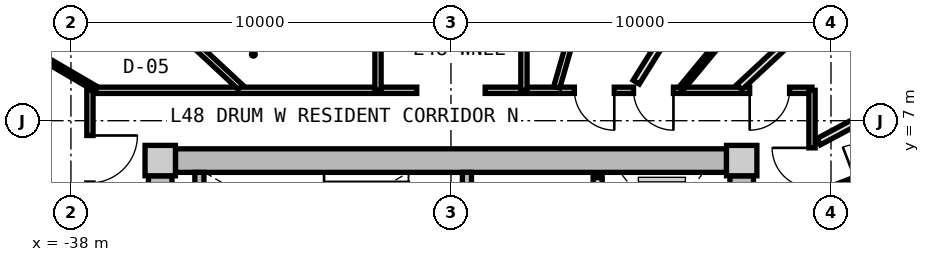
"""IFC4 building model, lengths in metres.
Left out: names, types, materials, properties, quantities, classifications, styles, units other than length and angle.
Written with IfcOpenShell. Run it as: python <this file> out.ifc"""

import sys

from ifc_helpers import new_model, si_unit, direction, frame, frame_2d, origin, origin_2d, place, context, subcontext, project, spatial, rectangle, extrude, source, transform, mapped, element, fill, save


model = new_model("IFC4")
c1 = context("Model", 3, precision=1e-05, world=origin(), true_north=direction((0.0, 1.0)))
c2 = subcontext(c1, "Body", "Model", "MODEL_VIEW")
j1 = project(units=[si_unit("LENGTHUNIT", "METRE"), si_unit("PLANEANGLEUNIT", "RADIAN")], contexts=[c1])
p1 = place(None, origin())
s1 = spatial("IfcSite", under=j1, at=p1, CompositionType="ELEMENT")
p2 = place(p1, origin())
s2 = spatial("IfcBuilding", under=s1, at=p2, CompositionType="ELEMENT")
p3 = place(p2, frame((0.0, 0.0, 155.65)))
s3 = spatial("IfcBuildingStorey", under=s2, at=p3, CompositionType="ELEMENT", Elevation=155.65)
m1 = source(origin(), c2, "Body", "SweptSolid", [
    extrude(rectangle(XDim=0.8, YDim=0.8, at=origin_2d()), origin(), (0.0, 0.0, 1.0), 3.05),
])
for number, where, z_axis, x_axis in (
    (1, (-20.35, 5.95, 0.0), (0.0, 0.0, 1.0), (1.0, 0.0, 0.0)),
    (2, (-35.65, 5.95, 0.0), (0.0, 0.0, 1.0), (1.0, 0.0, 0.0)),
):
    element("IfcColumn", number, at=place(p3, frame(where, z_axis=z_axis, x_axis=x_axis)), inside=s3, PredefinedType="COLUMN", context=c2, shape_type="MappedRepresentation", body=[
        mapped(m1, transform((0.0, 0.0, 0.0), x_axis=(1.0, 0.0, 0.0), y_axis=(0.0, 1.0, 0.0), z_axis=(0.0, 0.0, 1.0), scale=1.0)),
    ])
m2 = source(origin(), c2, "Body", "SweptSolid", [
    extrude(rectangle(XDim=14.5, YDim=0.62, at=frame_2d((7.25, 0.0))), origin(), (0.0, 0.0, 1.0), 2.81),
])
p4 = place(p3, frame((-35.25, 5.95, 0.0), z_axis=(0.0, 0.0, 1.0), x_axis=(1.0, 0.0, 0.0)))
e3 = element("IfcWall", 3, at=p4, inside=s3, PredefinedType="SHEAR", context=c2, shape_type="MappedRepresentation", body=[
    mapped(m2, transform((0.0, 0.0, 0.0), x_axis=(1.0, 0.0, 0.0), y_axis=(0.0, 1.0, 0.0), z_axis=(0.0, 0.0, 1.0), scale=1.0)),
])
m3 = source(origin(), c2, "Body", "SweptSolid", [
    extrude(rectangle(XDim=11.1, YDim=0.62, at=frame_2d((5.55, 0.0))), origin(), (0.0, 0.0, 1.0), 2.81),
])
p5 = place(p3, frame((-35.65, -5.55, 0.0), z_axis=(0.0, 0.0, 1.0), x_axis=(0.0, 1.0, 0.0)))
e4 = element("IfcWall", 4, at=p5, inside=s3, PredefinedType="SHEAR", context=c2, shape_type="MappedRepresentation", body=[
    mapped(m3, transform((0.0, 0.0, 0.0), x_axis=(1.0, 0.0, 0.0), y_axis=(0.0, 1.0, 0.0), z_axis=(0.0, 0.0, 1.0), scale=1.0)),
])
p6 = place(p5, frame((3.8, 0.0, 0.0)))
e5 = element("IfcOpeningElement", 5, at=p6, cuts=e4, PredefinedType="OPENING", context=c2, shape_type="SweptSolid", body=[
    extrude(rectangle(XDim=1.2, YDim=2.15, at=frame_2d((0.6, 1.075))), frame((0.0, 0.32, 0.0), z_axis=(0.0, -1.0, 0.0), x_axis=(1.0, 0.0, 0.0)), (0.0, 0.0, 1.0), 0.64),
])
p7 = place(p3, frame((-20.35, 5.55, 0.0), z_axis=(0.0, 0.0, 1.0), x_axis=(0.0, -1.0, 0.0)))
e6 = element("IfcWall", 6, at=p7, inside=s3, PredefinedType="SHEAR", context=c2, shape_type="MappedRepresentation", body=[
    mapped(m3, transform((0.0, 0.0, 0.0), x_axis=(1.0, 0.0, 0.0), y_axis=(0.0, 1.0, 0.0), z_axis=(0.0, 0.0, 1.0), scale=1.0)),
])
p8 = place(p7, frame((5.65, 0.0, 0.0)))
e7 = element("IfcOpeningElement", 7, at=p8, cuts=e6, PredefinedType="OPENING", context=c2, shape_type="SweptSolid", body=[
    extrude(rectangle(XDim=1.2, YDim=2.15, at=frame_2d((0.6, 1.075))), frame((0.0, 0.32, 0.0), z_axis=(0.0, -1.0, 0.0), x_axis=(1.0, 0.0, 0.0)), (0.0, 0.0, 1.0), 0.64),
])
m4 = source(origin(), c2, "Body", "SweptSolid", [
    extrude(rectangle(XDim=3.19, YDim=0.24, at=frame_2d((1.595, 0.0))), origin(), (0.0, 0.0, 1.0), 2.81),
])
p9 = place(p3, frame((-34.62, 2.45, 0.0), z_axis=(0.0, 0.0, 1.0), x_axis=(0.0, 1.0, 0.0)))
e8 = element("IfcWall", 8, at=p9, inside=s3, PredefinedType="PARTITIONING", context=c2, shape_type="MappedRepresentation", body=[
    mapped(m4, transform((0.0, 0.0, 0.0), x_axis=(1.0, 0.0, 0.0), y_axis=(0.0, 1.0, 0.0), z_axis=(0.0, 0.0, 1.0), scale=1.0)),
])
p10 = place(p3, frame((-27.58, 2.45, 0.0), z_axis=(0.0, 0.0, 1.0), x_axis=(0.0, 1.0, 0.0)))
e9 = element("IfcWall", 9, at=p10, inside=s3, PredefinedType="PARTITIONING", context=c2, shape_type="MappedRepresentation", body=[
    mapped(m4, transform((0.0, 0.0, 0.0), x_axis=(1.0, 0.0, 0.0), y_axis=(0.0, 1.0, 0.0), z_axis=(0.0, 0.0, 1.0), scale=1.0)),
])
p11 = place(p10, frame((0.55, 0.0, 0.0)))
e10 = element("IfcOpeningElement", 10, at=p11, cuts=e9, PredefinedType="OPENING", context=c2, shape_type="SweptSolid", body=[
    extrude(rectangle(XDim=1.1, YDim=2.15, at=frame_2d((0.55, 1.075))), frame((0.0, 0.13, 0.0), z_axis=(0.0, -1.0, 0.0), x_axis=(1.0, 0.0, 0.0)), (0.0, 0.0, 1.0), 0.26),
])
m5 = source(origin(), c2, "Body", "SweptSolid", [
    extrude(rectangle(XDim=5.0, YDim=0.24, at=frame_2d((2.5, 0.0))), origin(), (0.0, 0.0, 1.0), 2.795),
])
p12 = place(p3, frame((-24.14, 0.5, 0.0), z_axis=(0.0, 0.0, 1.0), x_axis=(0.0, 1.0, 0.0)))
e11 = element("IfcWall", 11, at=p12, inside=s3, PredefinedType="PARTITIONING", context=c2, shape_type="MappedRepresentation", body=[
    mapped(m5, transform((0.0, 0.0, 0.0), x_axis=(1.0, 0.0, 0.0), y_axis=(0.0, 1.0, 0.0), z_axis=(0.0, 0.0, 1.0), scale=1.0)),
])
p13 = place(p12, frame((3.05, 0.0, 0.0)))
e12 = element("IfcOpeningElement", 12, at=p13, cuts=e11, PredefinedType="OPENING", context=c2, shape_type="SweptSolid", body=[
    extrude(rectangle(XDim=1.3, YDim=2.2, at=frame_2d((0.65, 1.1))), frame((0.0, 0.13, 0.0), z_axis=(0.0, -1.0, 0.0), x_axis=(1.0, 0.0, 0.0)), (0.0, 0.0, 1.0), 0.26),
])
p14 = place(p12, frame((0.55, 0.0, 0.0)))
e13 = element("IfcOpeningElement", 13, at=p14, cuts=e11, PredefinedType="OPENING", context=c2, shape_type="SweptSolid", body=[
    extrude(rectangle(XDim=1.3, YDim=2.2, at=frame_2d((0.65, 1.1))), frame((0.0, 0.13, 0.0), z_axis=(0.0, -1.0, 0.0), x_axis=(1.0, 0.0, 0.0)), (0.0, 0.0, 1.0), 0.26),
])
m6 = source(origin(), c2, "Body", "SweptSolid", [
    extrude(rectangle(XDim=8.6, YDim=0.165, at=frame_2d((4.3, 0.0))), origin(), (0.0, 0.0, 1.0), 2.795),
])
p15 = place(p3, frame((-37.5, 7.8, 0.0), z_axis=(0.0, 0.0, 1.0), x_axis=(1.0, 0.0, 0.0)))
e14 = element("IfcWall", 14, at=p15, inside=s3, PredefinedType="PARTITIONING", context=c2, shape_type="MappedRepresentation", body=[
    mapped(m6, transform((0.0, 0.0, 0.0), x_axis=(1.0, 0.0, 0.0), y_axis=(0.0, 1.0, 0.0), z_axis=(0.0, 0.0, 1.0), scale=1.0)),
])
p16 = place(p3, frame((-27.1, 7.8, 0.0), z_axis=(0.0, 0.0, 1.0), x_axis=(1.0, 0.0, 0.0)))
e15 = element("IfcWall", 15, at=p16, inside=s3, PredefinedType="PARTITIONING", context=c2, shape_type="MappedRepresentation", body=[
    mapped(m6, transform((0.0, 0.0, 0.0), x_axis=(1.0, 0.0, 0.0), y_axis=(0.0, 1.0, 0.0), z_axis=(0.0, 0.0, 1.0), scale=1.0)),
])
p17 = place(p16, frame((6.96, 0.0, 0.0)))
e16 = element("IfcOpeningElement", 16, at=p17, cuts=e15, PredefinedType="OPENING", context=c2, shape_type="SweptSolid", body=[
    extrude(rectangle(XDim=1.05, YDim=2.15, at=frame_2d((0.525, 1.075))), frame((0.0, 0.093, 0.0), z_axis=(0.0, -1.0, 0.0), x_axis=(1.0, 0.0, 0.0)), (0.0, 0.0, 1.0), 0.185),
])
p18 = place(p16, frame((3.904, 0.0, 0.0)))
e17 = element("IfcOpeningElement", 17, at=p18, cuts=e15, PredefinedType="OPENING", context=c2, shape_type="SweptSolid", body=[
    extrude(rectangle(XDim=1.05, YDim=2.15, at=frame_2d((0.525, 1.075))), frame((0.0, 0.093, 0.0), z_axis=(0.0, -1.0, 0.0), x_axis=(1.0, 0.0, 0.0)), (0.0, 0.0, 1.0), 0.185),
])
p19 = place(p16, frame((2.347, 0.0, 0.0)))
e18 = element("IfcOpeningElement", 18, at=p19, cuts=e15, PredefinedType="OPENING", context=c2, shape_type="SweptSolid", body=[
    extrude(rectangle(XDim=1.05, YDim=2.15, at=frame_2d((0.525, 1.075))), frame((0.0, 0.093, 0.0), z_axis=(0.0, -1.0, 0.0), x_axis=(1.0, 0.0, 0.0)), (0.0, 0.0, 1.0), 0.185),
])
m7 = source(origin(), c2, "Body", "SweptSolid", [
    extrude(rectangle(XDim=15.6, YDim=0.165, at=frame_2d((7.8, 0.0))), origin(), (0.0, 0.0, 1.0), 2.795),
])
p20 = place(p3, frame((-37.5, -7.8, 0.0), z_axis=(0.0, 0.0, 1.0), x_axis=(0.0, 1.0, 0.0)))
e19 = element("IfcWall", 19, at=p20, inside=s3, PredefinedType="PARTITIONING", context=c2, shape_type="MappedRepresentation", body=[
    mapped(m7, transform((0.0, 0.0, 0.0), x_axis=(1.0, 0.0, 0.0), y_axis=(0.0, 1.0, 0.0), z_axis=(0.0, 0.0, 1.0), scale=1.0)),
])
p21 = place(p20, frame((13.16, 0.0, 0.0)))
e20 = element("IfcOpeningElement", 20, at=p21, cuts=e19, PredefinedType="OPENING", context=c2, shape_type="SweptSolid", body=[
    extrude(rectangle(XDim=1.25, YDim=2.2, at=frame_2d((0.625, 1.1))), frame((0.0, 0.093, 0.0), z_axis=(0.0, -1.0, 0.0), x_axis=(1.0, 0.0, 0.0)), (0.0, 0.0, 1.0), 0.185),
])
p22 = place(p20, frame((7.757, 0.0, 0.0)))
e21 = element("IfcOpeningElement", 21, at=p22, cuts=e19, PredefinedType="OPENING", context=c2, shape_type="SweptSolid", body=[
    extrude(rectangle(XDim=1.25, YDim=2.2, at=frame_2d((0.625, 1.1))), frame((0.0, 0.093, 0.0), z_axis=(0.0, -1.0, 0.0), x_axis=(1.0, 0.0, 0.0)), (0.0, 0.0, 1.0), 0.185),
])
p23 = place(p20, frame((1.62, 0.0, 0.0)))
e22 = element("IfcOpeningElement", 22, at=p23, cuts=e19, PredefinedType="OPENING", context=c2, shape_type="SweptSolid", body=[
    extrude(rectangle(XDim=1.25, YDim=2.2, at=frame_2d((0.625, 1.1))), frame((0.0, 0.093, 0.0), z_axis=(0.0, -1.0, 0.0), x_axis=(1.0, 0.0, 0.0)), (0.0, 0.0, 1.0), 0.185),
])
p24 = place(p3, frame((-18.5, 7.8, 0.0), z_axis=(0.0, 0.0, 1.0), x_axis=(0.0, -1.0, 0.0)))
e23 = element("IfcWall", 23, at=p24, inside=s3, PredefinedType="PARTITIONING", context=c2, shape_type="MappedRepresentation", body=[
    mapped(m7, transform((0.0, 0.0, 0.0), x_axis=(1.0, 0.0, 0.0), y_axis=(0.0, 1.0, 0.0), z_axis=(0.0, 0.0, 1.0), scale=1.0)),
])
p25 = place(p24, frame((8.314, 0.0, 0.0)))
e24 = element("IfcOpeningElement", 24, at=p25, cuts=e23, PredefinedType="OPENING", context=c2, shape_type="SweptSolid", body=[
    extrude(rectangle(XDim=1.25, YDim=2.2, at=frame_2d((0.625, 1.1))), frame((0.0, 0.093, 0.0), z_axis=(0.0, -1.0, 0.0), x_axis=(1.0, 0.0, 0.0)), (0.0, 0.0, 1.0), 0.185),
])
p26 = place(p24, frame((1.515, 0.0, 0.0)))
e25 = element("IfcOpeningElement", 25, at=p26, cuts=e23, PredefinedType="OPENING", context=c2, shape_type="SweptSolid", body=[
    extrude(rectangle(XDim=1.05, YDim=2.15, at=frame_2d((0.525, 1.075))), frame((0.0, 0.093, 0.0), z_axis=(0.0, -1.0, 0.0), x_axis=(1.0, 0.0, 0.0)), (0.0, 0.0, 1.0), 0.185),
])
m8 = source(origin(), c2, "Body", "SweptSolid", [
    extrude(rectangle(XDim=9.73, YDim=0.165, at=frame_2d((4.865, 0.0))), origin(), (0.0, 0.0, 1.0), 2.345),
])
p27 = place(p3, frame((-25.217, 7.88, 0.0), z_axis=(0.0, 0.0, 1.0), x_axis=(0.27679492614, 0.960929013436, 0.0)))
e26 = element("IfcWall", 26, at=p27, inside=s3, PredefinedType="PARTITIONING", context=c2, shape_type="MappedRepresentation", body=[
    mapped(m8, transform((0.0, 0.0, 0.0), x_axis=(1.0, 0.0, 0.0), y_axis=(0.0, 1.0, 0.0), z_axis=(0.0, 0.0, 1.0), scale=1.0)),
])
m9 = source(origin(), c2, "Body", "SweptSolid", [
    extrude(rectangle(XDim=7.648, YDim=0.165, at=frame_2d((3.824, 0.0))), origin(), (0.0, 0.0, 1.0), 2.435),
])
p28 = place(p3, frame((-33.538, 7.88, 0.0), z_axis=(0.0, 0.0, 1.0), x_axis=(-0.732167856666, 0.681124239522, 0.0)))
e27 = element("IfcWall", 27, at=p28, inside=s3, PredefinedType="PARTITIONING", context=c2, shape_type="MappedRepresentation", body=[
    mapped(m9, transform((0.0, 0.0, 0.0), x_axis=(1.0, 0.0, 0.0), y_axis=(0.0, 1.0, 0.0), z_axis=(0.0, 0.0, 1.0), scale=1.0)),
])
m10 = source(origin(), c2, "Body", "SweptSolid", [
    extrude(rectangle(XDim=7.465, YDim=0.165, at=frame_2d((3.733, 0.0))), origin(), (0.0, 0.0, 1.0), 2.345),
])
p29 = place(p3, frame((-29.92, 7.8, 0.0), z_axis=(0.0, 0.0, 1.0), x_axis=(0.0, 1.0, 0.0)))
e28 = element("IfcWall", 28, at=p29, inside=s3, PredefinedType="PARTITIONING", context=c2, shape_type="MappedRepresentation", body=[
    mapped(m10, transform((0.0, 0.0, 0.0), x_axis=(1.0, 0.0, 0.0), y_axis=(0.0, 1.0, 0.0), z_axis=(0.0, 0.0, 1.0), scale=1.0)),
])
p30 = place(p29, frame((3.208, 0.0, 0.0)))
e29 = element("IfcOpeningElement", 29, at=p30, cuts=e28, PredefinedType="OPENING", context=c2, shape_type="SweptSolid", body=[
    extrude(rectangle(XDim=1.05, YDim=2.15, at=frame_2d((0.525, 1.075))), frame((0.0, 0.093, 0.0), z_axis=(0.0, -1.0, 0.0), x_axis=(1.0, 0.0, 0.0)), (0.0, 0.0, 1.0), 0.185),
])
m11 = source(origin(), c2, "Body", "SweptSolid", [
    extrude(rectangle(XDim=7.465, YDim=0.165, at=frame_2d((3.733, 0.0))), origin(), (0.0, 0.0, 1.0), 2.795),
])
p31 = place(p3, frame((-26.08, 7.8, 0.0), z_axis=(0.0, 0.0, 1.0), x_axis=(0.0, 1.0, 0.0)))
e30 = element("IfcWall", 30, at=p31, inside=s3, PredefinedType="PARTITIONING", context=c2, shape_type="MappedRepresentation", body=[
    mapped(m11, transform((0.0, 0.0, 0.0), x_axis=(1.0, 0.0, 0.0), y_axis=(0.0, 1.0, 0.0), z_axis=(0.0, 0.0, 1.0), scale=1.0)),
])
p32 = place(p31, frame((3.208, 0.0, 0.0)))
e31 = element("IfcOpeningElement", 31, at=p32, cuts=e30, PredefinedType="OPENING", context=c2, shape_type="SweptSolid", body=[
    extrude(rectangle(XDim=1.05, YDim=2.15, at=frame_2d((0.525, 1.075))), frame((0.0, 0.093, 0.0), z_axis=(0.0, -1.0, 0.0), x_axis=(1.0, 0.0, 0.0)), (0.0, 0.0, 1.0), 0.185),
])
m12 = source(origin(), c2, "Body", "SweptSolid", [
    extrude(rectangle(XDim=6.193, YDim=0.19, at=frame_2d((3.096, 0.0))), origin(), (0.0, 0.0, 1.0), 2.345),
])
p33 = place(p3, frame((-37.58, 4.419, 0.0), z_axis=(0.0, 0.0, 1.0), x_axis=(-0.970309243466, 0.241867674657, 0.0)))
e32 = element("IfcWall", 32, at=p33, inside=s3, PredefinedType="PARTITIONING", context=c2, shape_type="MappedRepresentation", body=[
    mapped(m12, transform((0.0, 0.0, 0.0), x_axis=(1.0, 0.0, 0.0), y_axis=(0.0, 1.0, 0.0), z_axis=(0.0, 0.0, 1.0), scale=1.0)),
])
m13 = source(origin(), c2, "Body", "SweptSolid", [
    extrude(rectangle(XDim=2.323, YDim=0.14, at=frame_2d((1.161, 0.0))), origin(), (0.0, 0.0, 1.0), 2.795),
])
p34 = place(p3, frame((-37.331, 7.83, 0.0), z_axis=(0.0, 0.0, 1.0), x_axis=(-0.863343994595, 0.504615841009, 0.0)))
e33 = element("IfcWall", 33, at=p34, inside=s3, PredefinedType="PARTITIONING", context=c2, shape_type="MappedRepresentation", body=[
    mapped(m13, transform((0.0, 0.0, 0.0), x_axis=(1.0, 0.0, 0.0), y_axis=(0.0, 1.0, 0.0), z_axis=(0.0, 0.0, 1.0), scale=1.0)),
])
m14 = source(origin(), c2, "Body", "SweptSolid", [
    extrude(rectangle(XDim=8.305, YDim=0.19, at=frame_2d((4.153, 0.0))), origin(), (0.0, 0.0, 1.0), 2.345),
])
p35 = place(p3, frame((-18.42, 3.908, 0.0), z_axis=(0.0, 0.0, 1.0), x_axis=(0.970309994378, 0.241864662175, 0.0)))
e34 = element("IfcWall", 34, at=p35, inside=s3, PredefinedType="PARTITIONING", context=c2, shape_type="MappedRepresentation", body=[
    mapped(m14, transform((0.0, 0.0, 0.0), x_axis=(1.0, 0.0, 0.0), y_axis=(0.0, 1.0, 0.0), z_axis=(0.0, 0.0, 1.0), scale=1.0)),
])
m15 = source(origin(), c2, "Body", "SweptSolid", [
    extrude(rectangle(XDim=7.648, YDim=0.19, at=frame_2d((3.824, 0.0))), origin(), (0.0, 0.0, 1.0), 2.345),
])
p36 = place(p3, frame((-20.413, 7.88, 0.0), z_axis=(0.0, 0.0, 1.0), x_axis=(0.732182665826, 0.681108320213, 0.0)))
e35 = element("IfcWall", 35, at=p36, inside=s3, PredefinedType="PARTITIONING", context=c2, shape_type="MappedRepresentation", body=[
    mapped(m15, transform((0.0, 0.0, 0.0), x_axis=(1.0, 0.0, 0.0), y_axis=(0.0, 1.0, 0.0), z_axis=(0.0, 0.0, 1.0), scale=1.0)),
])
m16 = source(origin(), c2, "Body", "SweptSolid", [
    extrude(rectangle(XDim=6.499, YDim=0.19, at=frame_2d((3.25, 0.0))), origin(), (0.0, 0.0, 1.0), 2.795),
])
p37 = place(p3, frame((-18.324, 6.449, 0.0), z_axis=(0.0, 0.0, 1.0), x_axis=(0.882715595921, 0.469907625729, 0.0)))
e36 = element("IfcWall", 36, at=p37, inside=s3, PredefinedType="PARTITIONING", context=c2, shape_type="MappedRepresentation", body=[
    mapped(m16, transform((0.0, 0.0, 0.0), x_axis=(1.0, 0.0, 0.0), y_axis=(0.0, 1.0, 0.0), z_axis=(0.0, 0.0, 1.0), scale=1.0)),
])
m17 = source(origin(), c2, "Body", "SweptSolid", [
    extrude(rectangle(XDim=3.295, YDim=0.14, at=frame_2d((1.647, 0.0))), origin(), (0.0, 0.0, 1.0), 2.795),
])
p38 = place(p3, frame((-18.47, 5.023, 0.0), z_axis=(0.0, 0.0, 1.0), x_axis=(0.934202224769, 0.356743890258, 0.0)))
e37 = element("IfcWall", 37, at=p38, inside=s3, PredefinedType="PARTITIONING", context=c2, shape_type="MappedRepresentation", body=[
    mapped(m17, transform((0.0, 0.0, 0.0), x_axis=(1.0, 0.0, 0.0), y_axis=(0.0, 1.0, 0.0), z_axis=(0.0, 0.0, 1.0), scale=1.0)),
])
p39 = place(p38, frame((1.188, 0.0, 0.0)))
e38 = element("IfcOpeningElement", 38, at=p39, cuts=e37, PredefinedType="OPENING", context=c2, shape_type="SweptSolid", body=[
    extrude(rectangle(XDim=0.92, YDim=2.1, at=frame_2d((0.46, 1.05))), frame((0.0, 0.08, 0.0), z_axis=(0.0, -1.0, 0.0), x_axis=(1.0, 0.0, 0.0)), (0.0, 0.0, 1.0), 0.16),
])
m18 = source(origin(), c2, "Body", "SweptSolid", [
    extrude(rectangle(XDim=8.422, YDim=0.19, at=frame_2d((4.211, 0.0))), origin(), (0.0, 0.0, 1.0), 2.795),
])
p40 = place(p3, frame((-23.125, 8.014, 0.0), z_axis=(0.0, 0.0, 1.0), x_axis=(0.52925352896, 0.848463730565, 0.0)))
e39 = element("IfcWall", 39, at=p40, inside=s3, PredefinedType="PARTITIONING", context=c2, shape_type="MappedRepresentation", body=[
    mapped(m18, transform((0.0, 0.0, 0.0), x_axis=(1.0, 0.0, 0.0), y_axis=(0.0, 1.0, 0.0), z_axis=(0.0, 0.0, 1.0), scale=1.0)),
])
m19 = source(origin(), c2, "Body", "SweptSolid", [
    extrude(rectangle(XDim=3.593, YDim=0.14, at=frame_2d((1.797, 0.0))), origin(), (0.0, 0.0, 1.0), 2.795),
])
p41 = place(p3, frame((-21.955, 7.83, 0.0), z_axis=(0.0, 0.0, 1.0), x_axis=(0.638271060163, 0.769811700196, 0.0)))
e40 = element("IfcWall", 40, at=p41, inside=s3, PredefinedType="PARTITIONING", context=c2, shape_type="MappedRepresentation", body=[
    mapped(m19, transform((0.0, 0.0, 0.0), x_axis=(1.0, 0.0, 0.0), y_axis=(0.0, 1.0, 0.0), z_axis=(0.0, 0.0, 1.0), scale=1.0)),
])
p42 = place(p41, frame((1.337, 0.0, 0.0)))
e41 = element("IfcOpeningElement", 41, at=p42, cuts=e40, PredefinedType="OPENING", context=c2, shape_type="SweptSolid", body=[
    extrude(rectangle(XDim=0.92, YDim=2.1, at=frame_2d((0.46, 1.05))), frame((0.0, 0.08, 0.0), z_axis=(0.0, -1.0, 0.0), x_axis=(1.0, 0.0, 0.0)), (0.0, 0.0, 1.0), 0.16),
])
m20 = source(origin(), c2, "Body", "SweptSolid", [
    extrude(rectangle(XDim=1.25, YDim=2.2, at=frame_2d((0.625, 1.1))), frame((0.0, 0.025, 0.0), z_axis=(0.0, -1.0, 0.0), x_axis=(1.0, 0.0, 0.0)), (0.0, 0.0, 1.0), 0.05),
])
p43 = place(p21, frame((1.25, 0.0, 0.0), z_axis=(0.0, 0.0, 1.0), x_axis=(-1.0, 0.0, 0.0)))
e42 = element("IfcDoor", 42, at=p43, inside=s3, OperationType="SINGLE_SWING_LEFT", PredefinedType="DOOR", context=c2, shape_type="MappedRepresentation", body=[
    mapped(m20, transform((0.0, 0.0, 0.0), x_axis=(1.0, 0.0, 0.0), y_axis=(0.0, 1.0, 0.0), z_axis=(0.0, 0.0, 1.0), scale=1.0)),
])
fill(e20, e42)
m21 = source(origin(), c2, "Body", "SweptSolid", [
    extrude(rectangle(XDim=1.05, YDim=2.15, at=frame_2d((0.525, 1.075))), frame((0.0, 0.025, 0.0), z_axis=(0.0, -1.0, 0.0), x_axis=(1.0, 0.0, 0.0)), (0.0, 0.0, 1.0), 0.05),
])
p44 = place(p26, frame((1.05, 0.0, 0.0), z_axis=(0.0, 0.0, 1.0), x_axis=(-1.0, 0.0, 0.0)))
e43 = element("IfcDoor", 43, at=p44, inside=s3, OperationType="SINGLE_SWING_RIGHT", PredefinedType="DOOR", context=c2, shape_type="MappedRepresentation", body=[
    mapped(m21, transform((0.0, 0.0, 0.0), x_axis=(1.0, 0.0, 0.0), y_axis=(0.0, 1.0, 0.0), z_axis=(0.0, 0.0, 1.0), scale=1.0)),
])
fill(e25, e43)
p45 = place(p17, frame((1.05, 0.0, 0.0), z_axis=(0.0, 0.0, 1.0), x_axis=(-1.0, 0.0, 0.0)))
e44 = element("IfcDoor", 44, at=p45, inside=s3, OperationType="SINGLE_SWING_RIGHT", PredefinedType="DOOR", context=c2, shape_type="MappedRepresentation", body=[
    mapped(m21, transform((0.0, 0.0, 0.0), x_axis=(1.0, 0.0, 0.0), y_axis=(0.0, 1.0, 0.0), z_axis=(0.0, 0.0, 1.0), scale=1.0)),
])
fill(e16, e44)
p46 = place(p18, frame((1.05, 0.0, 0.0), z_axis=(0.0, 0.0, 1.0), x_axis=(-1.0, 0.0, 0.0)))
e45 = element("IfcDoor", 45, at=p46, inside=s3, OperationType="SINGLE_SWING_LEFT", PredefinedType="DOOR", context=c2, shape_type="MappedRepresentation", body=[
    mapped(m21, transform((0.0, 0.0, 0.0), x_axis=(1.0, 0.0, 0.0), y_axis=(0.0, 1.0, 0.0), z_axis=(0.0, 0.0, 1.0), scale=1.0)),
])
fill(e17, e45)
p47 = place(p19, frame((1.05, 0.0, 0.0), z_axis=(0.0, 0.0, 1.0), x_axis=(-1.0, 0.0, 0.0)))
e46 = element("IfcDoor", 46, at=p47, inside=s3, OperationType="SINGLE_SWING_LEFT", PredefinedType="DOOR", context=c2, shape_type="MappedRepresentation", body=[
    mapped(m21, transform((0.0, 0.0, 0.0), x_axis=(1.0, 0.0, 0.0), y_axis=(0.0, 1.0, 0.0), z_axis=(0.0, 0.0, 1.0), scale=1.0)),
])
fill(e18, e46)
save(model, sys.argv[1])
